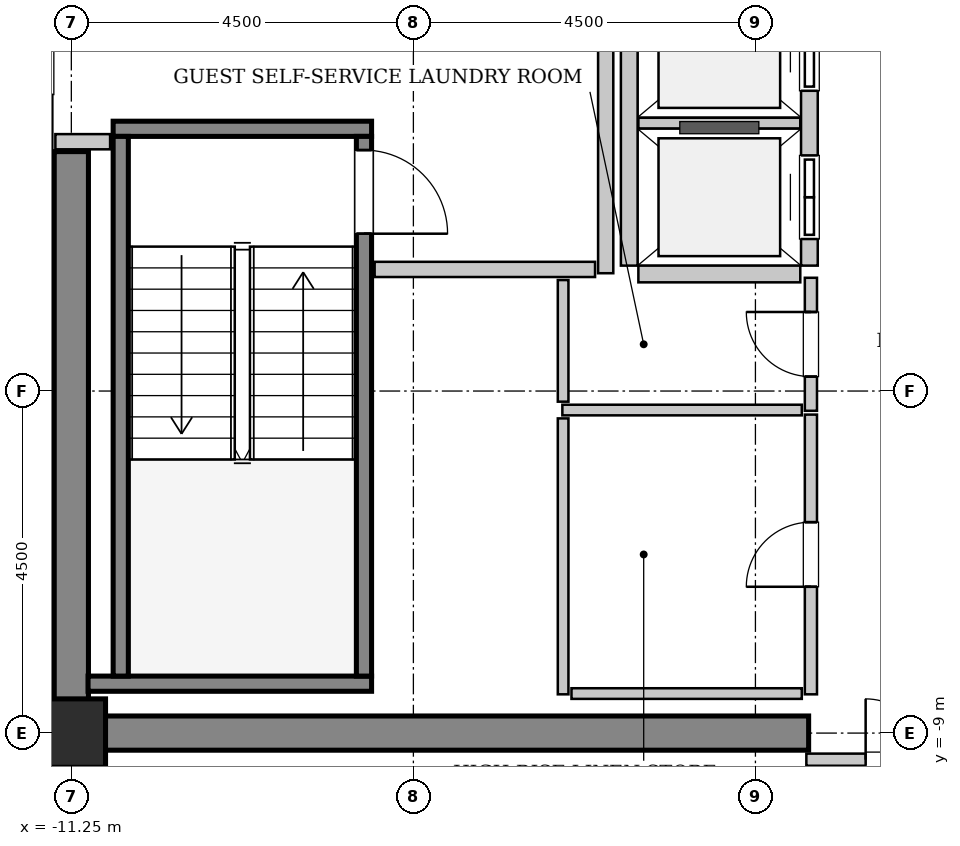
"""IFC4 building model, lengths in metres.
Left out: names, types, materials, properties, quantities, classifications, styles, units other than length and angle.
Written with IfcOpenShell. Run it as: python <this file> out.ifc"""

import sys

from ifc_helpers import new_model, si_unit, direction, frame, frame_2d, origin, origin_2d, place, context, subcontext, project, spatial, rectangle, extrude, source, transform, mapped, element, fill, save


model = new_model("IFC4")
c1 = context("Model", 3, precision=1e-05, world=origin(), true_north=direction((0.0, 1.0)))
c2 = subcontext(c1, "Body", "Model", "MODEL_VIEW")
j1 = project(units=[si_unit("LENGTHUNIT", "METRE"), si_unit("PLANEANGLEUNIT", "RADIAN")], contexts=[c1])
p1 = place(None, origin())
s1 = spatial("IfcSite", under=j1, at=p1, CompositionType="ELEMENT")
p2 = place(p1, origin())
s2 = spatial("IfcBuilding", under=s1, at=p2, CompositionType="ELEMENT")
p3 = place(p2, frame((0.0, 0.0, 310.2)))
s3 = spatial("IfcBuildingStorey", under=s2, at=p3, CompositionType="ELEMENT", Elevation=310.2)
m1 = source(origin(), c2, "Body", "SweptSolid", [
    extrude(rectangle(XDim=9.925, YDim=0.45, at=frame_2d((4.962, 0.0))), origin(), (0.0, 0.0, 1.0), 3.8),
])
p4 = place(p3, frame((-11.475, -9.0, 0.0), z_axis=(0.0, 0.0, 1.0), x_axis=(1.0, 0.0, 0.0)))
e1 = element("IfcWall", 1, at=p4, inside=s3, PredefinedType="SHEAR", context=c2, shape_type="MappedRepresentation", body=[
    mapped(m1, transform((0.0, 0.0, 0.0), x_axis=(1.0, 0.0, 0.0), y_axis=(0.0, 1.0, 0.0), z_axis=(0.0, 0.0, 1.0), scale=1.0)),
])
m2 = source(origin(), c2, "Body", "SweptSolid", [
    extrude(rectangle(XDim=7.425, YDim=0.45, at=frame_2d((3.712, 0.0))), origin(), (0.0, 0.0, 1.0), 3.8),
])
p5 = place(p3, frame((-11.25, -8.775, 0.0), z_axis=(0.0, 0.0, 1.0), x_axis=(0.0, 1.0, 0.0)))
e2 = element("IfcWall", 2, at=p5, inside=s3, PredefinedType="SHEAR", context=c2, shape_type="MappedRepresentation", body=[
    mapped(m2, transform((0.0, 0.0, 0.0), x_axis=(1.0, 0.0, 0.0), y_axis=(0.0, 1.0, 0.0), z_axis=(0.0, 0.0, 1.0), scale=1.0)),
])
m3 = source(origin(), c2, "Body", "SweptSolid", [
    extrude(rectangle(XDim=0.9, YDim=0.9, at=origin_2d()), origin(), (0.0, 0.0, 1.0), 3.8),
])
p6 = place(p3, frame((-11.25, -9.0, 0.0), z_axis=(0.0, 0.0, 1.0), x_axis=(1.0, 0.0, 0.0)))
e3 = element("IfcColumn", 3, at=p6, inside=s3, PredefinedType="COLUMN", context=c2, shape_type="MappedRepresentation", body=[
    mapped(m3, transform((0.0, 0.0, 0.0), x_axis=(1.0, 0.0, 0.0), y_axis=(0.0, 1.0, 0.0), z_axis=(0.0, 0.0, 1.0), scale=1.0)),
])
m4 = source(origin(), c2, "Body", "SweptSolid", [
    extrude(rectangle(XDim=3.4, YDim=0.2, at=frame_2d((1.7, 0.0))), origin(), (0.0, 0.0, 1.0), 3.8),
])
p7 = place(p3, frame((-10.7, -1.05, 0.0), z_axis=(0.0, 0.0, 1.0), x_axis=(1.0, 0.0, 0.0)))
e4 = element("IfcWall", 4, at=p7, inside=s3, PredefinedType="SOLIDWALL", context=c2, shape_type="MappedRepresentation", body=[
    mapped(m4, transform((0.0, 0.0, 0.0), x_axis=(1.0, 0.0, 0.0), y_axis=(0.0, 1.0, 0.0), z_axis=(0.0, 0.0, 1.0), scale=1.0)),
])
m5 = source(origin(), c2, "Body", "SweptSolid", [
    extrude(rectangle(XDim=3.73, YDim=0.2, at=frame_2d((1.865, 0.0))), origin(), (0.0, 0.0, 1.0), 3.8),
])
p8 = place(p3, frame((-11.03, -8.35, 0.0), z_axis=(0.0, 0.0, 1.0), x_axis=(1.0, 0.0, 0.0)))
e5 = element("IfcWall", 5, at=p8, inside=s3, PredefinedType="SOLIDWALL", context=c2, shape_type="MappedRepresentation", body=[
    mapped(m5, transform((0.0, 0.0, 0.0), x_axis=(1.0, 0.0, 0.0), y_axis=(0.0, 1.0, 0.0), z_axis=(0.0, 0.0, 1.0), scale=1.0)),
])
m6 = source(origin(), c2, "Body", "SweptSolid", [
    extrude(rectangle(XDim=7.1, YDim=0.2, at=frame_2d((3.55, 0.0))), origin(), (0.0, 0.0, 1.0), 3.8),
])
p9 = place(p3, frame((-10.6, -1.15, 0.0), z_axis=(0.0, 0.0, 1.0), x_axis=(0.0, -1.0, 0.0)))
e6 = element("IfcWall", 6, at=p9, inside=s3, PredefinedType="SOLIDWALL", context=c2, shape_type="MappedRepresentation", body=[
    mapped(m6, transform((0.0, 0.0, 0.0), x_axis=(1.0, 0.0, 0.0), y_axis=(0.0, 1.0, 0.0), z_axis=(0.0, 0.0, 1.0), scale=1.0)),
])
p10 = place(p3, frame((-7.4, -1.15, 0.0), z_axis=(0.0, 0.0, 1.0), x_axis=(0.0, -1.0, 0.0)))
e7 = element("IfcWall", 7, at=p10, inside=s3, PredefinedType="SOLIDWALL", context=c2, shape_type="MappedRepresentation", body=[
    mapped(m6, transform((0.0, 0.0, 0.0), x_axis=(1.0, 0.0, 0.0), y_axis=(0.0, 1.0, 0.0), z_axis=(0.0, 0.0, 1.0), scale=1.0)),
])
p11 = place(p10, frame((0.18, 0.0, 0.0)))
e8 = element("IfcOpeningElement", 8, at=p11, cuts=e7, PredefinedType="OPENING", context=c2, shape_type="SweptSolid", body=[
    extrude(rectangle(XDim=1.1, YDim=2.15, at=frame_2d((0.55, 1.075))), frame((0.0, 0.11, 0.0), z_axis=(0.0, -1.0, 0.0), x_axis=(1.0, 0.0, 0.0)), (0.0, 0.0, 1.0), 0.22),
])
m7 = source(origin(), c2, "Body", "SweptSolid", [
    extrude(rectangle(XDim=5.7, YDim=0.22, at=frame_2d((2.85, 0.0))), origin(), (0.0, 0.0, 1.0), 3.535),
])
p12 = place(p3, frame((-1.54, -2.85, 0.0), z_axis=(0.0, 0.0, 1.0), x_axis=(0.0, 1.0, 0.0)))
e9 = element("IfcWall", 9, at=p12, inside=s3, PredefinedType="SOLIDWALL", context=c2, shape_type="MappedRepresentation", body=[
    mapped(m7, transform((0.0, 0.0, 0.0), x_axis=(1.0, 0.0, 0.0), y_axis=(0.0, 1.0, 0.0), z_axis=(0.0, 0.0, 1.0), scale=1.0)),
])
p13 = place(p12, frame((0.35, 0.0, 0.0)))
e10 = element("IfcOpeningElement", 10, at=p13, cuts=e9, PredefinedType="OPENING", context=c2, shape_type="SweptSolid", body=[
    extrude(rectangle(XDim=1.1, YDim=2.2, at=frame_2d((0.55, 1.1))), frame((0.0, 0.12, 0.0), z_axis=(0.0, -1.0, 0.0), x_axis=(1.0, 0.0, 0.0)), (0.0, 0.0, 1.0), 0.24),
])
p14 = place(p12, frame((2.3, 0.0, 0.0)))
e11 = element("IfcOpeningElement", 11, at=p14, cuts=e9, PredefinedType="OPENING", context=c2, shape_type="SweptSolid", body=[
    extrude(rectangle(XDim=1.1, YDim=2.2, at=frame_2d((0.55, 1.1))), frame((0.0, 0.12, 0.0), z_axis=(0.0, -1.0, 0.0), x_axis=(1.0, 0.0, 0.0)), (0.0, 0.0, 1.0), 0.24),
])
p15 = place(p12, frame((4.25, 0.0, 0.0)))
e12 = element("IfcOpeningElement", 12, at=p15, cuts=e9, PredefinedType="OPENING", context=c2, shape_type="SweptSolid", body=[
    extrude(rectangle(XDim=1.1, YDim=2.2, at=frame_2d((0.55, 1.1))), frame((0.0, 0.12, 0.0), z_axis=(0.0, -1.0, 0.0), x_axis=(1.0, 0.0, 0.0)), (0.0, 0.0, 1.0), 0.24),
])
p16 = place(p3, frame((-3.91, 2.85, 0.0), z_axis=(0.0, 0.0, 1.0), x_axis=(0.0, -1.0, 0.0)))
e13 = element("IfcWall", 13, at=p16, inside=s3, PredefinedType="SOLIDWALL", context=c2, shape_type="MappedRepresentation", body=[
    mapped(m7, transform((0.0, 0.0, 0.0), x_axis=(1.0, 0.0, 0.0), y_axis=(0.0, 1.0, 0.0), z_axis=(0.0, 0.0, 1.0), scale=1.0)),
])
m8 = source(origin(), c2, "Body", "SweptSolid", [
    extrude(rectangle(XDim=2.13, YDim=0.22, at=frame_2d((1.065, 0.0))), origin(), (0.0, 0.0, 1.0), 3.535),
])
p17 = place(p3, frame((-3.79, -2.96, 0.0), z_axis=(0.0, 0.0, 1.0), x_axis=(1.0, 0.0, 0.0)))
e14 = element("IfcWall", 14, at=p17, inside=s3, PredefinedType="SOLIDWALL", context=c2, shape_type="MappedRepresentation", body=[
    mapped(m8, transform((0.0, 0.0, 0.0), x_axis=(1.0, 0.0, 0.0), y_axis=(0.0, 1.0, 0.0), z_axis=(0.0, 0.0, 1.0), scale=1.0)),
])
m9 = source(origin(), c2, "Body", "SweptSolid", [
    extrude(rectangle(XDim=2.13, YDim=0.14, at=frame_2d((1.065, 0.0))), origin(), (0.0, 0.0, 1.0), 3.535),
])
p18 = place(p3, frame((-3.79, -0.975, 0.0), z_axis=(0.0, 0.0, 1.0), x_axis=(1.0, 0.0, 0.0)))
e15 = element("IfcWall", 15, at=p18, inside=s3, PredefinedType="PARTITIONING", context=c2, shape_type="MappedRepresentation", body=[
    mapped(m9, transform((0.0, 0.0, 0.0), x_axis=(1.0, 0.0, 0.0), y_axis=(0.0, 1.0, 0.0), z_axis=(0.0, 0.0, 1.0), scale=1.0)),
])
m10 = source(origin(), c2, "Body", "SweptSolid", [
    extrude(rectangle(XDim=5.9, YDim=0.2, at=frame_2d((2.95, 0.0))), origin(), (0.0, 0.0, 1.0), 3.535),
])
p19 = place(p3, frame((-4.22, -2.95, 0.0), z_axis=(0.0, 0.0, 1.0), x_axis=(0.0, 1.0, 0.0)))
e16 = element("IfcWall", 16, at=p19, inside=s3, PredefinedType="PARTITIONING", context=c2, shape_type="MappedRepresentation", body=[
    mapped(m10, transform((0.0, 0.0, 0.0), x_axis=(1.0, 0.0, 0.0), y_axis=(0.0, 1.0, 0.0), z_axis=(0.0, 0.0, 1.0), scale=1.0)),
])
m11 = source(origin(), c2, "Body", "SweptSolid", [
    extrude(rectangle(XDim=2.9, YDim=0.2, at=frame_2d((1.45, 0.0))), origin(), (0.0, 0.0, 1.0), 3.535),
])
p20 = place(p3, frame((-7.26, -2.9, 0.0), z_axis=(0.0, 0.0, 1.0), x_axis=(1.0, 0.0, 0.0)))
e17 = element("IfcWall", 17, at=p20, inside=s3, PredefinedType="PARTITIONING", context=c2, shape_type="MappedRepresentation", body=[
    mapped(m11, transform((0.0, 0.0, 0.0), x_axis=(1.0, 0.0, 0.0), y_axis=(0.0, 1.0, 0.0), z_axis=(0.0, 0.0, 1.0), scale=1.0)),
])
m12 = source(origin(), c2, "Body", "SweptSolid", [
    extrude(rectangle(XDim=0.72, YDim=0.2, at=frame_2d((0.36, 0.0))), origin(), (0.0, 0.0, 1.0), 3.535),
])
p21 = place(p3, frame((-11.46, -1.22, 0.0), z_axis=(0.0, 0.0, 1.0), x_axis=(1.0, 0.0, 0.0)))
e18 = element("IfcWall", 18, at=p21, inside=s3, PredefinedType="PARTITIONING", context=c2, shape_type="MappedRepresentation", body=[
    mapped(m12, transform((0.0, 0.0, 0.0), x_axis=(1.0, 0.0, 0.0), y_axis=(0.0, 1.0, 0.0), z_axis=(0.0, 0.0, 1.0), scale=1.0)),
])
m13 = source(origin(), c2, "Body", "SweptSolid", [
    extrude(rectangle(XDim=3.16, YDim=0.16, at=frame_2d((1.58, 0.0))), origin(), (0.0, 0.0, 1.0), 2.625),
])
p22 = place(p3, frame((-1.58, -9.35, 0.0), z_axis=(0.0, 0.0, 1.0), x_axis=(1.0, 0.0, 0.0)))
e19 = element("IfcWall", 19, at=p22, inside=s3, PredefinedType="PARTITIONING", context=c2, shape_type="MappedRepresentation", body=[
    mapped(m13, transform((0.0, 0.0, 0.0), x_axis=(1.0, 0.0, 0.0), y_axis=(0.0, 1.0, 0.0), z_axis=(0.0, 0.0, 1.0), scale=1.0)),
])
p23 = place(p22, frame((0.78, 0.0, 0.0)))
e20 = element("IfcOpeningElement", 20, at=p23, cuts=e19, PredefinedType="OPENING", context=c2, shape_type="SweptSolid", body=[
    extrude(rectangle(XDim=1.6, YDim=2.3, at=frame_2d((0.8, 1.15))), frame((0.0, 0.09, 0.0), z_axis=(0.0, -1.0, 0.0), x_axis=(1.0, 0.0, 0.0)), (0.0, 0.0, 1.0), 0.18),
])
m14 = source(origin(), c2, "Body", "SweptSolid", [
    extrude(rectangle(XDim=1.75, YDim=0.16, at=frame_2d((0.875, 0.0))), origin(), (0.0, 0.0, 1.0), 3.535),
])
p24 = place(p3, frame((-1.52, -4.76, 0.0), z_axis=(0.0, 0.0, 1.0), x_axis=(0.0, 1.0, 0.0)))
e21 = element("IfcWall", 21, at=p24, inside=s3, PredefinedType="PARTITIONING", context=c2, shape_type="MappedRepresentation", body=[
    mapped(m14, transform((0.0, 0.0, 0.0), x_axis=(1.0, 0.0, 0.0), y_axis=(0.0, 1.0, 0.0), z_axis=(0.0, 0.0, 1.0), scale=1.0)),
])
p25 = place(p24, frame((0.45, 0.0, 0.0)))
e22 = element("IfcOpeningElement", 22, at=p25, cuts=e21, PredefinedType="OPENING", context=c2, shape_type="SweptSolid", body=[
    extrude(rectangle(XDim=0.85, YDim=2.1, at=frame_2d((0.425, 1.05))), frame((0.0, 0.09, 0.0), z_axis=(0.0, -1.0, 0.0), x_axis=(1.0, 0.0, 0.0)), (0.0, 0.0, 1.0), 0.18),
])
m15 = source(origin(), c2, "Body", "SweptSolid", [
    extrude(rectangle(XDim=3.15, YDim=0.14, at=frame_2d((1.575, 0.0))), origin(), (0.0, 0.0, 1.0), 3.535),
])
p26 = place(p3, frame((-4.79, -4.75, 0.0), z_axis=(0.0, 0.0, 1.0), x_axis=(1.0, 0.0, 0.0)))
e23 = element("IfcWall", 23, at=p26, inside=s3, PredefinedType="PARTITIONING", context=c2, shape_type="MappedRepresentation", body=[
    mapped(m15, transform((0.0, 0.0, 0.0), x_axis=(1.0, 0.0, 0.0), y_axis=(0.0, 1.0, 0.0), z_axis=(0.0, 0.0, 1.0), scale=1.0)),
])
m16 = source(origin(), c2, "Body", "SweptSolid", [
    extrude(rectangle(XDim=1.6, YDim=0.14, at=frame_2d((0.8, 0.0))), origin(), (0.0, 0.0, 1.0), 3.535),
])
p27 = place(p3, frame((-4.78, -4.64, 0.0), z_axis=(0.0, 0.0, 1.0), x_axis=(0.0, 1.0, 0.0)))
e24 = element("IfcWall", 24, at=p27, inside=s3, PredefinedType="PARTITIONING", context=c2, shape_type="MappedRepresentation", body=[
    mapped(m16, transform((0.0, 0.0, 0.0), x_axis=(1.0, 0.0, 0.0), y_axis=(0.0, 1.0, 0.0), z_axis=(0.0, 0.0, 1.0), scale=1.0)),
])
m17 = source(origin(), c2, "Body", "SweptSolid", [
    extrude(rectangle(XDim=3.68, YDim=0.16, at=frame_2d((1.84, 0.0))), origin(), (0.0, 0.0, 1.0), 3.535),
])
p28 = place(p3, frame((-1.52, -8.49, 0.0), z_axis=(0.0, 0.0, 1.0), x_axis=(0.0, 1.0, 0.0)))
e25 = element("IfcWall", 25, at=p28, inside=s3, PredefinedType="PARTITIONING", context=c2, shape_type="MappedRepresentation", body=[
    mapped(m17, transform((0.0, 0.0, 0.0), x_axis=(1.0, 0.0, 0.0), y_axis=(0.0, 1.0, 0.0), z_axis=(0.0, 0.0, 1.0), scale=1.0)),
])
p29 = place(p28, frame((1.415, 0.0, 0.0)))
e26 = element("IfcOpeningElement", 26, at=p29, cuts=e25, PredefinedType="OPENING", context=c2, shape_type="SweptSolid", body=[
    extrude(rectangle(XDim=0.85, YDim=2.1, at=frame_2d((0.425, 1.05))), frame((0.0, 0.09, 0.0), z_axis=(0.0, -1.0, 0.0), x_axis=(1.0, 0.0, 0.0)), (0.0, 0.0, 1.0), 0.18),
])
m18 = source(origin(), c2, "Body", "SweptSolid", [
    extrude(rectangle(XDim=3.63, YDim=0.14, at=frame_2d((1.815, 0.0))), origin(), (0.0, 0.0, 1.0), 3.535),
])
p30 = place(p3, frame((-4.78, -8.49, 0.0), z_axis=(0.0, 0.0, 1.0), x_axis=(0.0, 1.0, 0.0)))
e27 = element("IfcWall", 27, at=p30, inside=s3, PredefinedType="PARTITIONING", context=c2, shape_type="MappedRepresentation", body=[
    mapped(m18, transform((0.0, 0.0, 0.0), x_axis=(1.0, 0.0, 0.0), y_axis=(0.0, 1.0, 0.0), z_axis=(0.0, 0.0, 1.0), scale=1.0)),
])
m19 = source(origin(), c2, "Body", "SweptSolid", [
    extrude(rectangle(XDim=3.03, YDim=0.14, at=frame_2d((1.515, 0.0))), origin(), (0.0, 0.0, 1.0), 3.535),
])
p31 = place(p3, frame((-4.67, -8.48, 0.0), z_axis=(0.0, 0.0, 1.0), x_axis=(1.0, 0.0, 0.0)))
e28 = element("IfcWall", 28, at=p31, inside=s3, PredefinedType="PARTITIONING", context=c2, shape_type="MappedRepresentation", body=[
    mapped(m19, transform((0.0, 0.0, 0.0), x_axis=(1.0, 0.0, 0.0), y_axis=(0.0, 1.0, 0.0), z_axis=(0.0, 0.0, 1.0), scale=1.0)),
])
m20 = source(origin(), c2, "Body", "SweptSolid", [
    extrude(rectangle(XDim=1.1, YDim=2.15, at=frame_2d((0.55, 1.075))), frame((0.0, 0.025, 0.0), z_axis=(0.0, -1.0, 0.0), x_axis=(1.0, 0.0, 0.0)), (0.0, 0.0, 1.0), 0.05),
])
p32 = place(p11, origin())
e29 = element("IfcDoor", 29, at=p32, inside=s3, OperationType="SINGLE_SWING_RIGHT", PredefinedType="DOOR", context=c2, shape_type="MappedRepresentation", body=[
    mapped(m20, transform((0.0, 0.0, 0.0), x_axis=(1.0, 0.0, 0.0), y_axis=(0.0, 1.0, 0.0), z_axis=(0.0, 0.0, 1.0), scale=1.0)),
])
fill(e8, e29)
m21 = source(origin(), c2, "Body", "SweptSolid", [
    extrude(rectangle(XDim=1.1, YDim=2.2, at=frame_2d((0.55, 1.1))), frame((0.0, 0.025, 0.0), z_axis=(0.0, -1.0, 0.0), x_axis=(1.0, 0.0, 0.0)), (0.0, 0.0, 1.0), 0.05),
])
p33 = place(p13, origin())
e30 = element("IfcDoor", 30, at=p33, inside=s3, OperationType="DOUBLE_DOOR_SLIDING", PredefinedType="DOOR", context=c2, shape_type="MappedRepresentation", body=[
    mapped(m21, transform((0.0, 0.0, 0.0), x_axis=(1.0, 0.0, 0.0), y_axis=(0.0, 1.0, 0.0), z_axis=(0.0, 0.0, 1.0), scale=1.0)),
])
fill(e10, e30)
p34 = place(p14, origin())
e31 = element("IfcDoor", 31, at=p34, inside=s3, OperationType="DOUBLE_DOOR_SLIDING", PredefinedType="DOOR", context=c2, shape_type="MappedRepresentation", body=[
    mapped(m21, transform((0.0, 0.0, 0.0), x_axis=(1.0, 0.0, 0.0), y_axis=(0.0, 1.0, 0.0), z_axis=(0.0, 0.0, 1.0), scale=1.0)),
])
fill(e11, e31)
m22 = source(origin(), c2, "Body", "SweptSolid", [
    extrude(rectangle(XDim=1.6, YDim=2.3, at=frame_2d((0.8, 1.15))), frame((0.0, 0.025, 0.0), z_axis=(0.0, -1.0, 0.0), x_axis=(1.0, 0.0, 0.0)), (0.0, 0.0, 1.0), 0.05),
])
p35 = place(p23, origin())
e32 = element("IfcDoor", 32, at=p35, inside=s3, OperationType="DOUBLE_DOOR_SINGLE_SWING", PredefinedType="DOOR", context=c2, shape_type="MappedRepresentation", body=[
    mapped(m22, transform((0.0, 0.0, 0.0), x_axis=(1.0, 0.0, 0.0), y_axis=(0.0, 1.0, 0.0), z_axis=(0.0, 0.0, 1.0), scale=1.0)),
])
fill(e20, e32)
m23 = source(origin(), c2, "Body", "SweptSolid", [
    extrude(rectangle(XDim=0.85, YDim=2.1, at=frame_2d((0.425, 1.05))), frame((0.0, 0.025, 0.0), z_axis=(0.0, -1.0, 0.0), x_axis=(1.0, 0.0, 0.0)), (0.0, 0.0, 1.0), 0.05),
])
p36 = place(p25, origin())
e33 = element("IfcDoor", 33, at=p36, inside=s3, OperationType="SINGLE_SWING_RIGHT", PredefinedType="DOOR", context=c2, shape_type="MappedRepresentation", body=[
    mapped(m23, transform((0.0, 0.0, 0.0), x_axis=(1.0, 0.0, 0.0), y_axis=(0.0, 1.0, 0.0), z_axis=(0.0, 0.0, 1.0), scale=1.0)),
])
fill(e22, e33)
p37 = place(p29, origin())
e34 = element("IfcDoor", 34, at=p37, inside=s3, OperationType="SINGLE_SWING_LEFT", PredefinedType="DOOR", context=c2, shape_type="MappedRepresentation", body=[
    mapped(m23, transform((0.0, 0.0, 0.0), x_axis=(1.0, 0.0, 0.0), y_axis=(0.0, 1.0, 0.0), z_axis=(0.0, 0.0, 1.0), scale=1.0)),
])
fill(e26, e34)
save(model, sys.argv[1])
